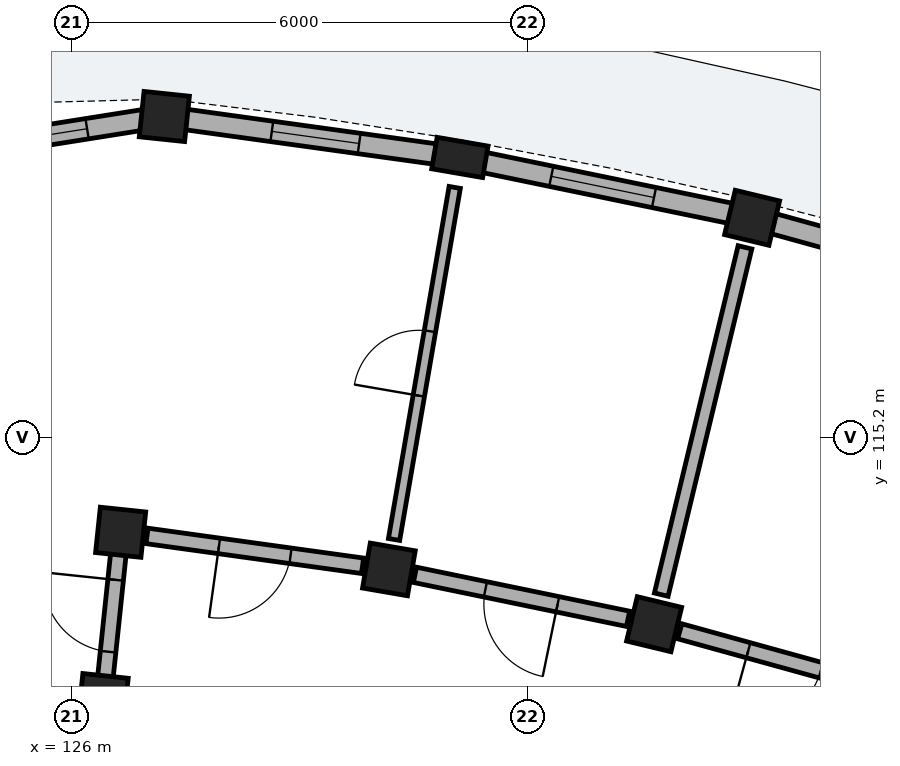
"""IFC4 building model, lengths in metres.
Left out: names, types, materials, properties, quantities, classifications, styles, units other than length and angle.
Written with IfcOpenShell. Run it as: python <this file> out.ifc"""

import sys

from ifc_helpers import new_model, si_unit, direction, frame, frame_2d, origin, origin_2d, place, context, subcontext, project, spatial, rectangle, extrude, element, fill, save


model = new_model("IFC4")
c1 = context("Model", 3, precision=1e-05, world=origin(), true_north=direction((0.0, 1.0)))
c2 = subcontext(c1, "Body", "Model", "MODEL_VIEW")
j1 = project(units=[si_unit("LENGTHUNIT", "METRE"), si_unit("PLANEANGLEUNIT", "RADIAN")], contexts=[c1])
p1 = place(None, origin())
s1 = spatial("IfcSite", under=j1, at=p1, CompositionType="ELEMENT")
p2 = place(p1, origin())
s2 = spatial("IfcBuilding", under=s1, at=p2, CompositionType="ELEMENT")
p3 = place(p2, origin())
s3 = spatial("IfcBuildingStorey", under=s2, at=p3, CompositionType="ELEMENT", Elevation=0.0)
for number, where, z_axis, x_axis in (
    (1, (133.669, 112.744, 0.0), (0.0, 0.0, 1.0), (0.234, 0.972, 0.0)),
    (2, (134.958, 118.091, 0.0), (0.0, 0.0, 1.0), (0.234, 0.972, 0.0)),
    (3, (130.179, 113.465, 0.0), (0.0, 0.0, 1.0), (0.17, 0.985, 0.0)),
):
    element("IfcColumn", number, at=place(p3, frame(where, z_axis=z_axis, x_axis=x_axis)), inside=s3, PredefinedType="COLUMN", context=c2, shape_type="SweptSolid", body=[
        extrude(rectangle(XDim=0.6, YDim=0.6, at=origin_2d()), origin(), (0.0, 0.0, 1.0), 4.485),
    ])
p4 = place(p3, frame((131.113, 118.885, 0.0), z_axis=(0.0, 0.0, 1.0), x_axis=(0.169827230012, 0.985473851478, 0.0)))
e4 = element("IfcColumn", 4, at=p4, inside=s3, PredefinedType="PILASTER", context=c2, shape_type="SweptSolid", body=[
    extrude(rectangle(XDim=0.42, YDim=0.68, at=origin_2d()), origin(), (0.0, 0.0, 1.0), 4.485),
])
for number, where, z_axis, x_axis in (
    (5, (126.42, 111.766, 0.0), (0.0, 0.0, 1.0), (0.105, 0.995, 0.0)),
    (6, (126.65, 113.954, 0.0), (0.0, 0.0, 1.0), (0.105, 0.995, 0.0)),
    (7, (127.225, 119.424, 0.0), (0.0, 0.0, 1.0), (0.105, 0.995, 0.0)),
):
    element("IfcColumn", number, at=place(p3, frame(where, z_axis=z_axis, x_axis=x_axis)), inside=s3, PredefinedType="COLUMN", context=c2, shape_type="SweptSolid", body=[
        extrude(rectangle(XDim=0.6, YDim=0.6, at=origin_2d()), origin(), (0.0, 0.0, 1.0), 4.485),
    ])
p5 = place(p3, frame((138.568, 117.094, 0.0), z_axis=(0.0, 0.0, 1.0), x_axis=(-0.963896315356, 0.266277849706, 0.0)))
e8 = element("IfcWall", 8, at=p5, inside=s3, PredefinedType="SOLIDWALL", context=c2, shape_type="SweptSolid", body=[
    extrude(rectangle(XDim=3.476, YDim=0.27, at=frame_2d((1.738, 0.0))), origin(), (0.0, 0.0, 1.0), 3.755),
])
p6 = place(p5, frame((1.198, 0.0, 0.55)))
e9 = element("IfcOpeningElement", 9, at=p6, cuts=e8, PredefinedType="OPENING", context=c2, shape_type="SweptSolid", body=[
    extrude(rectangle(XDim=1.08, YDim=1.45, at=frame_2d((0.54, 0.725))), frame((0.0, 0.145, 0.0), z_axis=(0.0, -1.0, 0.0), x_axis=(1.0, 0.0, 0.0)), (0.0, 0.0, 1.0), 0.29),
])
p7 = place(p3, frame((134.693, 118.146, 0.0), z_axis=(0.0, 0.0, 1.0), x_axis=(-0.979337720299, 0.202231623637, 0.0)))
e10 = element("IfcWall", 10, at=p7, inside=s3, PredefinedType="SOLIDWALL", context=c2, shape_type="SweptSolid", body=[
    extrude(rectangle(XDim=3.476, YDim=0.27, at=frame_2d((1.738, 0.0))), origin(), (0.0, 0.0, 1.0), 3.755),
])
p8 = place(p7, frame((1.048, 0.0, 0.55)))
e11 = element("IfcOpeningElement", 11, at=p8, cuts=e10, PredefinedType="OPENING", context=c2, shape_type="SweptSolid", body=[
    extrude(rectangle(XDim=1.38, YDim=1.56, at=frame_2d((0.69, 0.78))), frame((0.0, 0.145, 0.0), z_axis=(0.0, -1.0, 0.0), x_axis=(1.0, 0.0, 0.0)), (0.0, 0.0, 1.0), 0.29),
])
p9 = place(p3, frame((130.935, 118.91, 0.0), z_axis=(0.0, 0.0, 1.0), x_axis=(-0.990535032048, 0.137260155494, 0.0)))
e12 = element("IfcWall", 12, at=p9, inside=s3, PredefinedType="SOLIDWALL", context=c2, shape_type="SweptSolid", body=[
    extrude(rectangle(XDim=3.476, YDim=0.27, at=frame_2d((1.738, 0.0))), origin(), (0.0, 0.0, 1.0), 3.755),
])
p10 = place(p9, frame((1.158, 0.0, 0.55)))
e13 = element("IfcOpeningElement", 13, at=p10, cuts=e12, PredefinedType="OPENING", context=c2, shape_type="SweptSolid", body=[
    extrude(rectangle(XDim=1.16, YDim=1.485, at=frame_2d((0.58, 0.743))), frame((0.0, 0.145, 0.0), z_axis=(0.0, -1.0, 0.0), x_axis=(1.0, 0.0, 0.0)), (0.0, 0.0, 1.0), 0.29),
])
p11 = place(p3, frame((123.365, 118.812, 0.0), z_axis=(0.0, 0.0, 1.0), x_axis=(0.987690429048, 0.156421278498, 0.0)))
e14 = element("IfcWall", 14, at=p11, inside=s3, PredefinedType="SOLIDWALL", context=c2, shape_type="SweptSolid", body=[
    extrude(rectangle(XDim=3.908, YDim=0.27, at=frame_2d((1.954, 0.0))), origin(), (0.0, 0.0, 1.0), 3.755),
])
p12 = place(p11, frame((1.029, 0.0, 0.4)))
e15 = element("IfcOpeningElement", 15, at=p12, cuts=e14, PredefinedType="OPENING", context=c2, shape_type="SweptSolid", body=[
    extrude(rectangle(XDim=1.85, YDim=1.72, at=frame_2d((0.925, 0.86))), frame((0.0, 0.145, 0.0), z_axis=(0.0, -1.0, 0.0), x_axis=(1.0, 0.0, 0.0)), (0.0, 0.0, 1.0), 0.29),
])
p13 = place(p3, frame((136.766, 111.889, 0.0), z_axis=(0.0, 0.0, 1.0), x_axis=(-0.963890789093, 0.266297853356, 0.0)))
e16 = element("IfcWall", 16, at=p13, inside=s3, PredefinedType="PARTITIONING", context=c2, shape_type="SweptSolid", body=[
    extrude(rectangle(XDim=2.863, YDim=0.205, at=frame_2d((1.432, 0.0))), origin(), (0.0, 0.0, 1.0), 3.1),
])
p14 = place(p13, frame((0.937, 0.0, 0.0)))
e17 = element("IfcOpeningElement", 17, at=p14, cuts=e16, PredefinedType="OPENING", context=c2, shape_type="SweptSolid", body=[
    extrude(rectangle(XDim=0.99, YDim=2.16, at=frame_2d((0.495, 1.08))), frame((0.0, 0.113, 0.0), z_axis=(0.0, -1.0, 0.0), x_axis=(1.0, 0.0, 0.0)), (0.0, 0.0, 1.0), 0.225),
])
p15 = place(p3, frame((133.762, 113.133, 0.0), z_axis=(0.0, 0.0, 1.0), x_axis=(0.234386624934, 0.972143461662, 0.0)))
e18 = element("IfcWall", 18, at=p15, inside=s3, PredefinedType="PARTITIONING", context=c2, shape_type="SweptSolid", body=[
    extrude(rectangle(XDim=4.7, YDim=0.185, at=frame_2d((2.35, 0.0))), origin(), (0.0, 0.0, 1.0), 3.1),
])
p16 = place(p3, frame((133.326, 112.815, 0.0), z_axis=(0.0, 0.0, 1.0), x_axis=(-0.979348418612, 0.202179808492, 0.0)))
e19 = element("IfcWall", 19, at=p16, inside=s3, PredefinedType="PARTITIONING", context=c2, shape_type="SweptSolid", body=[
    extrude(rectangle(XDim=2.863, YDim=0.205, at=frame_2d((1.432, 0.0))), origin(), (0.0, 0.0, 1.0), 3.1),
])
p17 = place(p16, frame((0.947, 0.0, 0.0)))
e20 = element("IfcOpeningElement", 20, at=p17, cuts=e19, PredefinedType="OPENING", context=c2, shape_type="SweptSolid", body=[
    extrude(rectangle(XDim=0.97, YDim=2.15, at=frame_2d((0.485, 1.075))), frame((0.0, 0.113, 0.0), z_axis=(0.0, -1.0, 0.0), x_axis=(1.0, 0.0, 0.0)), (0.0, 0.0, 1.0), 0.225),
])
p18 = place(p3, frame((130.247, 113.859, 0.0), z_axis=(0.0, 0.0, 1.0), x_axis=(0.169812980219, 0.985476307046, 0.0)))
e21 = element("IfcWall", 21, at=p18, inside=s3, PredefinedType="PLUMBINGWALL", context=c2, shape_type="SweptSolid", body=[
    extrude(rectangle(XDim=4.7, YDim=0.15, at=frame_2d((2.35, 0.0))), origin(), (0.0, 0.0, 1.0), 3.1),
])
p19 = place(p18, frame((1.92, 0.0, 0.0)))
e22 = element("IfcOpeningElement", 22, at=p19, cuts=e21, PredefinedType="OPENING", context=c2, shape_type="SweptSolid", body=[
    extrude(rectangle(XDim=0.86, YDim=2.06, at=frame_2d((0.43, 1.03))), frame((0.0, 0.085, 0.0), z_axis=(0.0, -1.0, 0.0), x_axis=(1.0, 0.0, 0.0)), (0.0, 0.0, 1.0), 0.17),
])
p20 = place(p3, frame((129.833, 113.513, 0.0), z_axis=(0.0, 0.0, 1.0), x_axis=(-0.990544162976, 0.137194246211, 0.0)))
e23 = element("IfcWall", 23, at=p20, inside=s3, PredefinedType="PARTITIONING", context=c2, shape_type="SweptSolid", body=[
    extrude(rectangle(XDim=2.863, YDim=0.205, at=frame_2d((1.432, 0.0))), origin(), (0.0, 0.0, 1.0), 3.1),
])
p21 = place(p20, frame((0.957, 0.0, 0.0)))
e24 = element("IfcOpeningElement", 24, at=p21, cuts=e23, PredefinedType="OPENING", context=c2, shape_type="SweptSolid", body=[
    extrude(rectangle(XDim=0.95, YDim=2.13, at=frame_2d((0.475, 1.065))), frame((0.0, 0.113, 0.0), z_axis=(0.0, -1.0, 0.0), x_axis=(1.0, 0.0, 0.0)), (0.0, 0.0, 1.0), 0.225),
])
p22 = place(p3, frame((126.425, 111.816, 0.0), z_axis=(0.0, 0.0, 1.0), x_axis=(0.104509292252, 0.994523910136, 0.0)))
e25 = element("IfcWall", 25, at=p22, inside=s3, PredefinedType="PARTITIONING", context=c2, shape_type="SweptSolid", body=[
    extrude(rectangle(XDim=2.1, YDim=0.205, at=frame_2d((1.05, 0.0))), origin(), (0.0, 0.0, 1.0), 3.1),
])
p23 = place(p22, frame((0.57, 0.0, 0.0)))
e26 = element("IfcOpeningElement", 26, at=p23, cuts=e25, PredefinedType="OPENING", context=c2, shape_type="SweptSolid", body=[
    extrude(rectangle(XDim=0.95, YDim=2.13, at=frame_2d((0.475, 1.065))), frame((0.0, 0.113, 0.0), z_axis=(0.0, -1.0, 0.0), x_axis=(1.0, 0.0, 0.0)), (0.0, 0.0, 1.0), 0.225),
])
p24 = place(p8, origin())
e27 = element("IfcWindow", 27, at=p24, inside=s3, PartitioningType="SINGLE_PANEL", PredefinedType="WINDOW", context=c2, shape_type="SweptSolid", body=[
    extrude(rectangle(XDim=1.38, YDim=1.56, at=frame_2d((0.69, 0.78))), frame((0.0, 0.03, 0.0), z_axis=(0.0, -1.0, 0.0), x_axis=(1.0, 0.0, 0.0)), (0.0, 0.0, 1.0), 0.06),
])
fill(e11, e27)
p25 = place(p10, origin())
e28 = element("IfcWindow", 28, at=p25, inside=s3, PartitioningType="SINGLE_PANEL", PredefinedType="WINDOW", context=c2, shape_type="SweptSolid", body=[
    extrude(rectangle(XDim=1.16, YDim=1.485, at=frame_2d((0.58, 0.743))), frame((0.0, 0.03, 0.0), z_axis=(0.0, -1.0, 0.0), x_axis=(1.0, 0.0, 0.0)), (0.0, 0.0, 1.0), 0.06),
])
fill(e13, e28)
p26 = place(p12, origin())
e29 = element("IfcWindow", 29, at=p26, inside=s3, PartitioningType="SINGLE_PANEL", PredefinedType="WINDOW", context=c2, shape_type="SweptSolid", body=[
    extrude(rectangle(XDim=1.85, YDim=1.72, at=frame_2d((0.925, 0.86))), frame((0.0, 0.03, 0.0), z_axis=(0.0, -1.0, 0.0), x_axis=(1.0, 0.0, 0.0)), (0.0, 0.0, 1.0), 0.06),
])
fill(e15, e29)
p27 = place(p14, origin())
e30 = element("IfcDoor", 30, at=p27, inside=s3, OperationType="SINGLE_SWING_RIGHT", PredefinedType="DOOR", context=c2, shape_type="SweptSolid", body=[
    extrude(rectangle(XDim=0.99, YDim=2.16, at=frame_2d((0.495, 1.08))), frame((0.0, 0.025, 0.0), z_axis=(0.0, -1.0, 0.0), x_axis=(1.0, 0.0, 0.0)), (0.0, 0.0, 1.0), 0.05),
])
fill(e17, e30)
p28 = place(p17, origin())
e31 = element("IfcDoor", 31, at=p28, inside=s3, OperationType="SINGLE_SWING_LEFT", PredefinedType="DOOR", context=c2, shape_type="SweptSolid", body=[
    extrude(rectangle(XDim=0.97, YDim=2.15, at=frame_2d((0.485, 1.075))), frame((0.0, 0.025, 0.0), z_axis=(0.0, -1.0, 0.0), x_axis=(1.0, 0.0, 0.0)), (0.0, 0.0, 1.0), 0.05),
])
fill(e20, e31)
p29 = place(p19, origin())
e32 = element("IfcDoor", 32, at=p29, inside=s3, OperationType="SINGLE_SWING_LEFT", PredefinedType="DOOR", context=c2, shape_type="SweptSolid", body=[
    extrude(rectangle(XDim=0.86, YDim=2.06, at=frame_2d((0.43, 1.03))), frame((0.0, 0.025, 0.0), z_axis=(0.0, -1.0, 0.0), x_axis=(1.0, 0.0, 0.0)), (0.0, 0.0, 1.0), 0.05),
])
fill(e22, e32)
p30 = place(p21, origin())
e33 = element("IfcDoor", 33, at=p30, inside=s3, OperationType="SINGLE_SWING_RIGHT", PredefinedType="DOOR", context=c2, shape_type="SweptSolid", body=[
    extrude(rectangle(XDim=0.95, YDim=2.13, at=frame_2d((0.475, 1.065))), frame((0.0, 0.025, 0.0), z_axis=(0.0, -1.0, 0.0), x_axis=(1.0, 0.0, 0.0)), (0.0, 0.0, 1.0), 0.05),
])
fill(e24, e33)
p31 = place(p23, origin())
e34 = element("IfcDoor", 34, at=p31, inside=s3, OperationType="SINGLE_SWING_RIGHT", PredefinedType="DOOR", context=c2, shape_type="SweptSolid", body=[
    extrude(rectangle(XDim=0.95, YDim=2.13, at=frame_2d((0.475, 1.065))), frame((0.0, 0.025, 0.0), z_axis=(0.0, -1.0, 0.0), x_axis=(1.0, 0.0, 0.0)), (0.0, 0.0, 1.0), 0.05),
])
fill(e26, e34)
save(model, sys.argv[1])
